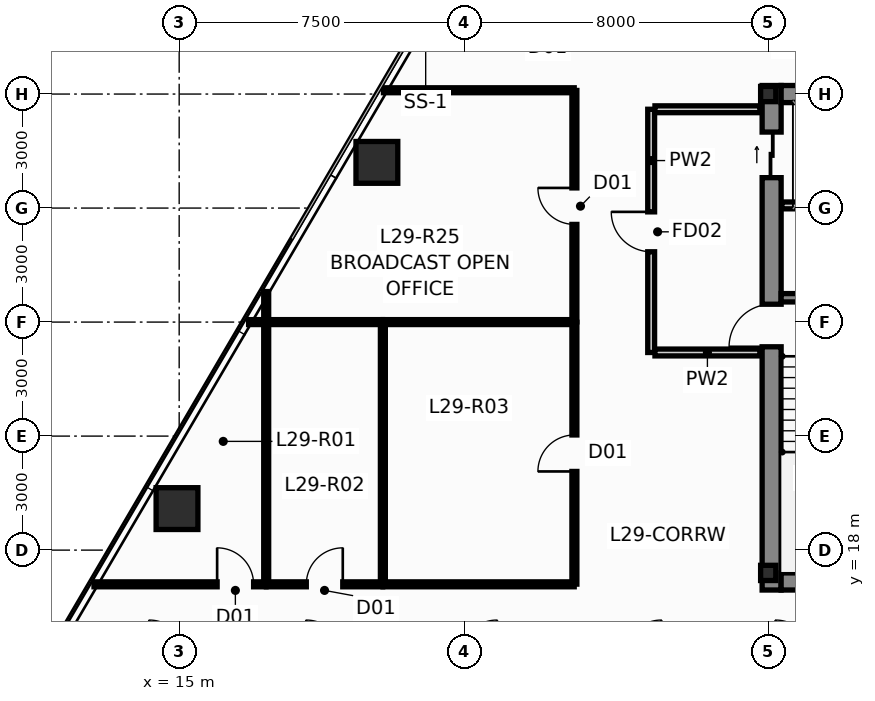
"""IFC4 building model, lengths in metres.
Left out: names, types, materials, properties, quantities, classifications, styles, units other than length and angle.
Written with IfcOpenShell. Run it as: python <this file> out.ifc"""

import sys

from ifc_helpers import new_model, si_unit, direction, frame, frame_2d, origin, origin_2d, place, context, subcontext, project, spatial, rectangle, hollow_rectangle, i_section, extrude, source, transform, mapped, element, fill, save


model = new_model("IFC4")
c1 = context("Model", 3, precision=1e-05, world=origin(), true_north=direction((0.0, 1.0)))
c2 = subcontext(c1, "Body", "Model", "MODEL_VIEW")
j1 = project(units=[si_unit("LENGTHUNIT", "METRE"), si_unit("PLANEANGLEUNIT", "RADIAN")], contexts=[c1])
p1 = place(None, origin())
s1 = spatial("IfcSite", under=j1, at=p1, CompositionType="ELEMENT")
p2 = place(p1, origin())
s2 = spatial("IfcBuilding", under=s1, at=p2, CompositionType="ELEMENT")
p3 = place(p2, frame((0.0, 0.0, 112.7)))
s3 = spatial("IfcBuildingStorey", under=s2, at=p3, CompositionType="ELEMENT", Elevation=112.7)
m1 = source(origin(), c2, "Body", "SweptSolid", [
    extrude(i_section(OverallWidth=0.4, OverallDepth=0.4, WebThickness=0.02, FlangeThickness=0.032, at=origin_2d()), origin(), (0.0, 0.0, 1.0), 3.65),
])
for number, where, z_axis, x_axis in (
    (1, (30.5, 17.4, 0.0), (0.0, 0.0, 1.0), (1.0, 0.0, 0.0)),
    (2, (30.5, 30.0, 0.0), (0.0, 0.0, 1.0), (1.0, 0.0, 0.0)),
):
    element("IfcColumn", number, at=place(p3, frame(where, z_axis=z_axis, x_axis=x_axis)), inside=s3, PredefinedType="COLUMN", context=c2, shape_type="MappedRepresentation", body=[
        mapped(m1, transform((0.0, 0.0, 0.0), scale=1.0)),
    ])
p4 = place(p3, frame((30.59, 16.95, 0.0), z_axis=(0.0, 0.0, 1.0), x_axis=(0.0, 1.0, 0.0)))
e3 = element("IfcWall", 3, at=p4, inside=s3, PredefinedType="SHEAR", context=c2, shape_type="SweptSolid", body=[
    extrude(rectangle(XDim=13.275, YDim=0.5, at=frame_2d((6.638, 0.0))), origin(), (0.0, 0.0, 1.0), 3.65),
])
p5 = place(p4, frame((6.4, 0.0, 0.0)))
e4 = element("IfcOpeningElement", 4, at=p5, cuts=e3, PredefinedType="OPENING", context=c2, shape_type="SweptSolid", body=[
    extrude(rectangle(XDim=1.12, YDim=2.15, at=frame_2d((0.56, 1.075))), frame((0.0, 0.262, 0.0), z_axis=(0.0, -1.0, 0.0), x_axis=(1.0, 0.0, 0.0)), (0.0, 0.0, 1.0), 0.524),
])
p6 = place(p4, frame((10.85, 0.0, 0.0)))
e5 = element("IfcOpeningElement", 5, at=p6, cuts=e3, PredefinedType="OPENING", context=c2, shape_type="SweptSolid", body=[
    extrude(rectangle(XDim=1.2, YDim=2.2, at=frame_2d((0.6, 1.1))), frame((0.0, 0.262, 0.0), z_axis=(0.0, -1.0, 0.0), x_axis=(1.0, 0.0, 0.0)), (0.0, 0.0, 1.0), 0.524),
])
for number, where, z_axis, x_axis in (
    (6, (30.84, 17.175, 0.0), (0.0, 0.0, 1.0), (1.0, 0.0, 0.0)),
    (7, (30.84, 30.0, 0.0), (0.0, 0.0, 1.0), (1.0, 0.0, 0.0)),
):
    element("IfcWall", number, at=place(p3, frame(where, z_axis=z_axis, x_axis=x_axis)), inside=s3, PredefinedType="SHEAR", context=c2, shape_type="SweptSolid", body=[
        extrude(rectangle(XDim=2.9, YDim=0.45, at=frame_2d((1.45, 0.0))), origin(), (0.0, 0.0, 1.0), 3.65),
    ])
p7 = place(p3, frame((30.84, 24.64, 0.0), z_axis=(0.0, 0.0, 1.0), x_axis=(1.0, 0.0, 0.0)))
e8 = element("IfcWall", 8, at=p7, inside=s3, PredefinedType="SHEAR", context=c2, shape_type="SweptSolid", body=[
    extrude(rectangle(XDim=2.9, YDim=0.22, at=frame_2d((1.45, 0.0))), origin(), (0.0, 0.0, 1.0), 3.65),
])
m2 = source(origin(), c2, "Body", "SweptSolid", [
    extrude(hollow_rectangle(XDim=1.1, YDim=1.1, WallThickness=0.06, at=origin_2d()), origin(), (0.0, 0.0, 1.0), 3.651),
])
p8 = place(p3, frame((20.202, 28.202, 0.0), z_axis=(0.014912316331, -0.013775502979, 0.999793907933), x_axis=(0.678553674548, 0.734550822447, 0.0)))
e9 = element("IfcColumn", 9, at=p8, inside=s3, PredefinedType="COLUMN", context=c2, shape_type="MappedRepresentation", body=[
    mapped(m2, transform((0.0, 0.0, 0.0), scale=1.0)),
])
m3 = source(origin(), c2, "Body", "SweptSolid", [
    extrude(hollow_rectangle(XDim=1.1, YDim=1.1, WallThickness=0.06, at=origin_2d()), origin(), (0.0, 0.0, 1.0), 3.651),
])
p9 = place(p3, frame((14.943, 19.093, 0.0), z_axis=(0.010431098089, -0.021530856313, 0.999713766245), x_axis=(0.899947055326, 0.435999194506, 0.0)))
e10 = element("IfcColumn", 10, at=p9, inside=s3, PredefinedType="COLUMN", context=c2, shape_type="MappedRepresentation", body=[
    mapped(m3, transform((0.0, 0.0, 0.0), scale=1.0)),
])
p10 = place(p3, frame((27.42, 23.2, 0.0), z_axis=(0.0, 0.0, 1.0), x_axis=(0.0, 1.0, 0.0)))
e11 = element("IfcWall", 11, at=p10, inside=s3, PredefinedType="PARTITIONING", context=c2, shape_type="SweptSolid", body=[
    extrude(rectangle(XDim=6.4, YDim=0.18, at=frame_2d((3.2, 0.0))), origin(), (0.0, 0.0, 1.0), 3.026),
])
p11 = place(p10, frame((2.65, 0.0, 0.0)))
e12 = element("IfcOpeningElement", 12, at=p11, cuts=e11, PredefinedType="OPENING", context=c2, shape_type="SweptSolid", body=[
    extrude(rectangle(XDim=1.05, YDim=2.15, at=frame_2d((0.525, 1.075))), frame((0.0, 0.102, 0.0), z_axis=(0.0, -1.0, 0.0), x_axis=(1.0, 0.0, 0.0)), (0.0, 0.0, 1.0), 0.204),
])
p12 = place(p3, frame((27.52, 23.2, 0.0), z_axis=(0.0, 0.0, 1.0), x_axis=(1.0, 0.0, 0.0)))
e13 = element("IfcWall", 13, at=p12, inside=s3, PredefinedType="PARTITIONING", context=c2, shape_type="SweptSolid", body=[
    extrude(rectangle(XDim=2.76, YDim=0.18, at=frame_2d((1.38, 0.0))), origin(), (0.0, 0.0, 1.0), 3.4),
])
p13 = place(p3, frame((27.52, 29.6, 0.0), z_axis=(0.0, 0.0, 1.0), x_axis=(1.0, 0.0, 0.0)))
e14 = element("IfcWall", 14, at=p13, inside=s3, PredefinedType="PARTITIONING", context=c2, shape_type="SweptSolid", body=[
    extrude(rectangle(XDim=2.76, YDim=0.18, at=frame_2d((1.38, 0.0))), origin(), (0.0, 0.0, 1.0), 2.783),
])
p14 = place(p3, frame((30.86, 27.07, 0.0), z_axis=(0.0, 0.0, 1.0), x_axis=(1.0, 0.0, 0.0)))
e15 = element("IfcWall", 15, at=p14, inside=s3, PredefinedType="PARTITIONING", context=c2, shape_type="SweptSolid", body=[
    extrude(rectangle(XDim=2.9, YDim=0.18, at=frame_2d((1.45, 0.0))), origin(), (0.0, 0.0, 1.0), 3.4),
])
p15 = place(p3, frame((25.4, 17.105, 0.0), z_axis=(0.0, 0.0, 1.0), x_axis=(0.0, 1.0, 0.0)))
e16 = element("IfcWall", 16, at=p15, inside=s3, PredefinedType="PARTITIONING", context=c2, shape_type="SweptSolid", body=[
    extrude(rectangle(XDim=6.89, YDim=0.13, at=frame_2d((3.445, 0.0))), origin(), (0.0, 0.0, 1.0), 3.026),
])
p16 = place(p15, frame((2.965, 0.0, 0.0)))
e17 = element("IfcOpeningElement", 17, at=p16, cuts=e16, PredefinedType="OPENING", context=c2, shape_type="SweptSolid", body=[
    extrude(rectangle(XDim=0.96, YDim=2.15, at=frame_2d((0.48, 1.075))), frame((0.0, 0.077, 0.0), z_axis=(0.0, -1.0, 0.0), x_axis=(1.0, 0.0, 0.0)), (0.0, 0.0, 1.0), 0.154),
])
p17 = place(p3, frame((17.29, 17.105, 0.0), z_axis=(0.0, 0.0, 1.0), x_axis=(0.0, 1.0, 0.0)))
e18 = element("IfcWall", 18, at=p17, inside=s3, PredefinedType="PARTITIONING", context=c2, shape_type="SweptSolid", body=[
    extrude(rectangle(XDim=7.699, YDim=0.13, at=frame_2d((3.849, 0.0))), origin(), (0.0, 0.0, 1.0), 3.4),
])
p18 = place(p3, frame((20.36, 17.105, 0.0), z_axis=(0.0, 0.0, 1.0), x_axis=(0.0, 1.0, 0.0)))
e19 = element("IfcWall", 19, at=p18, inside=s3, PredefinedType="PARTITIONING", context=c2, shape_type="SweptSolid", body=[
    extrude(rectangle(XDim=6.89, YDim=0.13, at=frame_2d((3.445, 0.0))), origin(), (0.0, 0.0, 1.0), 3.026),
])
p19 = place(p3, frame((25.4, 24.005, 0.0), z_axis=(0.0, 0.0, 1.0), x_axis=(0.0, 1.0, 0.0)))
e20 = element("IfcWall", 20, at=p19, inside=s3, PredefinedType="PARTITIONING", context=c2, shape_type="SweptSolid", body=[
    extrude(rectangle(XDim=6.09, YDim=0.13, at=frame_2d((3.045, 0.0))), origin(), (0.0, 0.0, 1.0), 3.026),
])
p20 = place(p19, frame((2.565, 0.0, 0.0)))
e21 = element("IfcOpeningElement", 21, at=p20, cuts=e20, PredefinedType="OPENING", context=c2, shape_type="SweptSolid", body=[
    extrude(rectangle(XDim=0.96, YDim=2.15, at=frame_2d((0.48, 1.075))), frame((0.0, 0.077, 0.0), z_axis=(0.0, -1.0, 0.0), x_axis=(1.0, 0.0, 0.0)), (0.0, 0.0, 1.0), 0.154),
])
p21 = place(p3, frame((25.395, 30.1, 0.0), z_axis=(0.0, 0.0, 1.0), x_axis=(-1.0, 0.0, 0.0)))
e22 = element("IfcWall", 22, at=p21, inside=s3, PredefinedType="PARTITIONING", context=c2, shape_type="SweptSolid", body=[
    extrude(rectangle(XDim=5.019, YDim=0.13, at=frame_2d((2.51, 0.0))), origin(), (0.0, 0.0, 1.0), 3.4),
])
for number, where, z_axis, x_axis in (
    (23, (20.365, 17.1, 0.0), (0.0, 0.0, 1.0), (1.0, 0.0, 0.0)),
    (24, (20.365, 24.0, 0.0), (0.0, 0.0, 1.0), (1.0, 0.0, 0.0)),
):
    element("IfcWall", number, at=place(p3, frame(where, z_axis=z_axis, x_axis=x_axis)), inside=s3, PredefinedType="PARTITIONING", context=c2, shape_type="SweptSolid", body=[
        extrude(rectangle(XDim=5.03, YDim=0.13, at=frame_2d((2.515, 0.0))), origin(), (0.0, 0.0, 1.0), 3.4),
    ])
p22 = place(p3, frame((12.759, 17.1, 0.0), z_axis=(0.0, 0.0, 1.0), x_axis=(1.0, 0.0, 0.0)))
e25 = element("IfcWall", 25, at=p22, inside=s3, PredefinedType="PARTITIONING", context=c2, shape_type="SweptSolid", body=[
    extrude(rectangle(XDim=4.526, YDim=0.13, at=frame_2d((2.263, 0.0))), origin(), (0.0, 0.0, 1.0), 3.4),
])
p23 = place(p22, frame((3.24, 0.0, 0.0)))
e26 = element("IfcOpeningElement", 26, at=p23, cuts=e25, PredefinedType="OPENING", context=c2, shape_type="SweptSolid", body=[
    extrude(rectangle(XDim=0.96, YDim=2.15, at=frame_2d((0.48, 1.075))), frame((0.0, 0.077, 0.0), z_axis=(0.0, -1.0, 0.0), x_axis=(1.0, 0.0, 0.0)), (0.0, 0.0, 1.0), 0.154),
])
p24 = place(p3, frame((17.295, 17.1, 0.0), z_axis=(0.0, 0.0, 1.0), x_axis=(1.0, 0.0, 0.0)))
e27 = element("IfcWall", 27, at=p24, inside=s3, PredefinedType="PARTITIONING", context=c2, shape_type="SweptSolid", body=[
    extrude(rectangle(XDim=3.06, YDim=0.13, at=frame_2d((1.53, 0.0))), origin(), (0.0, 0.0, 1.0), 3.4),
])
p25 = place(p24, frame((1.05, 0.0, 0.0)))
e28 = element("IfcOpeningElement", 28, at=p25, cuts=e27, PredefinedType="OPENING", context=c2, shape_type="SweptSolid", body=[
    extrude(rectangle(XDim=0.96, YDim=2.15, at=frame_2d((0.48, 1.075))), frame((0.0, 0.077, 0.0), z_axis=(0.0, -1.0, 0.0), x_axis=(1.0, 0.0, 0.0)), (0.0, 0.0, 1.0), 0.154),
])
p26 = place(p3, frame((16.827, 24.0, 0.0), z_axis=(0.0, 0.0, 1.0), x_axis=(1.0, 0.0, 0.0)))
e29 = element("IfcWall", 29, at=p26, inside=s3, PredefinedType="PARTITIONING", context=c2, shape_type="SweptSolid", body=[
    extrude(rectangle(XDim=3.528, YDim=0.13, at=frame_2d((1.764, 0.0))), origin(), (0.0, 0.0, 1.0), 3.4),
])
p27 = place(p5, origin())
e30 = element("IfcDoor", 30, at=p27, inside=s3, OperationType="SINGLE_SWING_LEFT", PredefinedType="DOOR", context=c2, shape_type="SweptSolid", body=[
    extrude(rectangle(XDim=1.12, YDim=2.15, at=frame_2d((0.56, 1.075))), frame((0.0, 0.025, 0.0), z_axis=(0.0, -1.0, 0.0), x_axis=(1.0, 0.0, 0.0)), (0.0, 0.0, 1.0), 0.05),
])
fill(e4, e30)
p28 = place(p6, origin())
e31 = element("IfcDoor", 31, at=p28, inside=s3, OperationType="SLIDING_TO_LEFT", PredefinedType="DOOR", context=c2, shape_type="SweptSolid", body=[
    extrude(rectangle(XDim=1.2, YDim=2.2, at=frame_2d((0.6, 1.1))), frame((0.0, 0.025, 0.0), z_axis=(0.0, -1.0, 0.0), x_axis=(1.0, 0.0, 0.0)), (0.0, 0.0, 1.0), 0.05),
])
fill(e5, e31)
p29 = place(p11, origin())
e32 = element("IfcDoor", 32, at=p29, inside=s3, OperationType="SINGLE_SWING_RIGHT", PredefinedType="DOOR", context=c2, shape_type="SweptSolid", body=[
    extrude(rectangle(XDim=1.05, YDim=2.15, at=frame_2d((0.525, 1.075))), frame((0.0, 0.025, 0.0), z_axis=(0.0, -1.0, 0.0), x_axis=(1.0, 0.0, 0.0)), (0.0, 0.0, 1.0), 0.05),
])
fill(e12, e32)
p30 = place(p16, origin())
e33 = element("IfcDoor", 33, at=p30, inside=s3, OperationType="SINGLE_SWING_LEFT", PredefinedType="DOOR", context=c2, shape_type="SweptSolid", body=[
    extrude(rectangle(XDim=0.96, YDim=2.15, at=frame_2d((0.48, 1.075))), frame((0.0, 0.025, 0.0), z_axis=(0.0, -1.0, 0.0), x_axis=(1.0, 0.0, 0.0)), (0.0, 0.0, 1.0), 0.05),
])
fill(e17, e33)
p31 = place(p20, origin())
e34 = element("IfcDoor", 34, at=p31, inside=s3, OperationType="SINGLE_SWING_RIGHT", PredefinedType="DOOR", context=c2, shape_type="SweptSolid", body=[
    extrude(rectangle(XDim=0.96, YDim=2.15, at=frame_2d((0.48, 1.075))), frame((0.0, 0.025, 0.0), z_axis=(0.0, -1.0, 0.0), x_axis=(1.0, 0.0, 0.0)), (0.0, 0.0, 1.0), 0.05),
])
fill(e21, e34)
p32 = place(p23, origin())
e35 = element("IfcDoor", 35, at=p32, inside=s3, OperationType="SINGLE_SWING_LEFT", PredefinedType="DOOR", context=c2, shape_type="SweptSolid", body=[
    extrude(rectangle(XDim=0.96, YDim=2.15, at=frame_2d((0.48, 1.075))), frame((0.0, 0.025, 0.0), z_axis=(0.0, -1.0, 0.0), x_axis=(1.0, 0.0, 0.0)), (0.0, 0.0, 1.0), 0.05),
])
fill(e26, e35)
p33 = place(p25, origin())
e36 = element("IfcDoor", 36, at=p33, inside=s3, OperationType="SINGLE_SWING_RIGHT", PredefinedType="DOOR", context=c2, shape_type="SweptSolid", body=[
    extrude(rectangle(XDim=0.96, YDim=2.15, at=frame_2d((0.48, 1.075))), frame((0.0, 0.025, 0.0), z_axis=(0.0, -1.0, 0.0), x_axis=(1.0, 0.0, 0.0)), (0.0, 0.0, 1.0), 0.05),
])
fill(e28, e36)
save(model, sys.argv[1])
